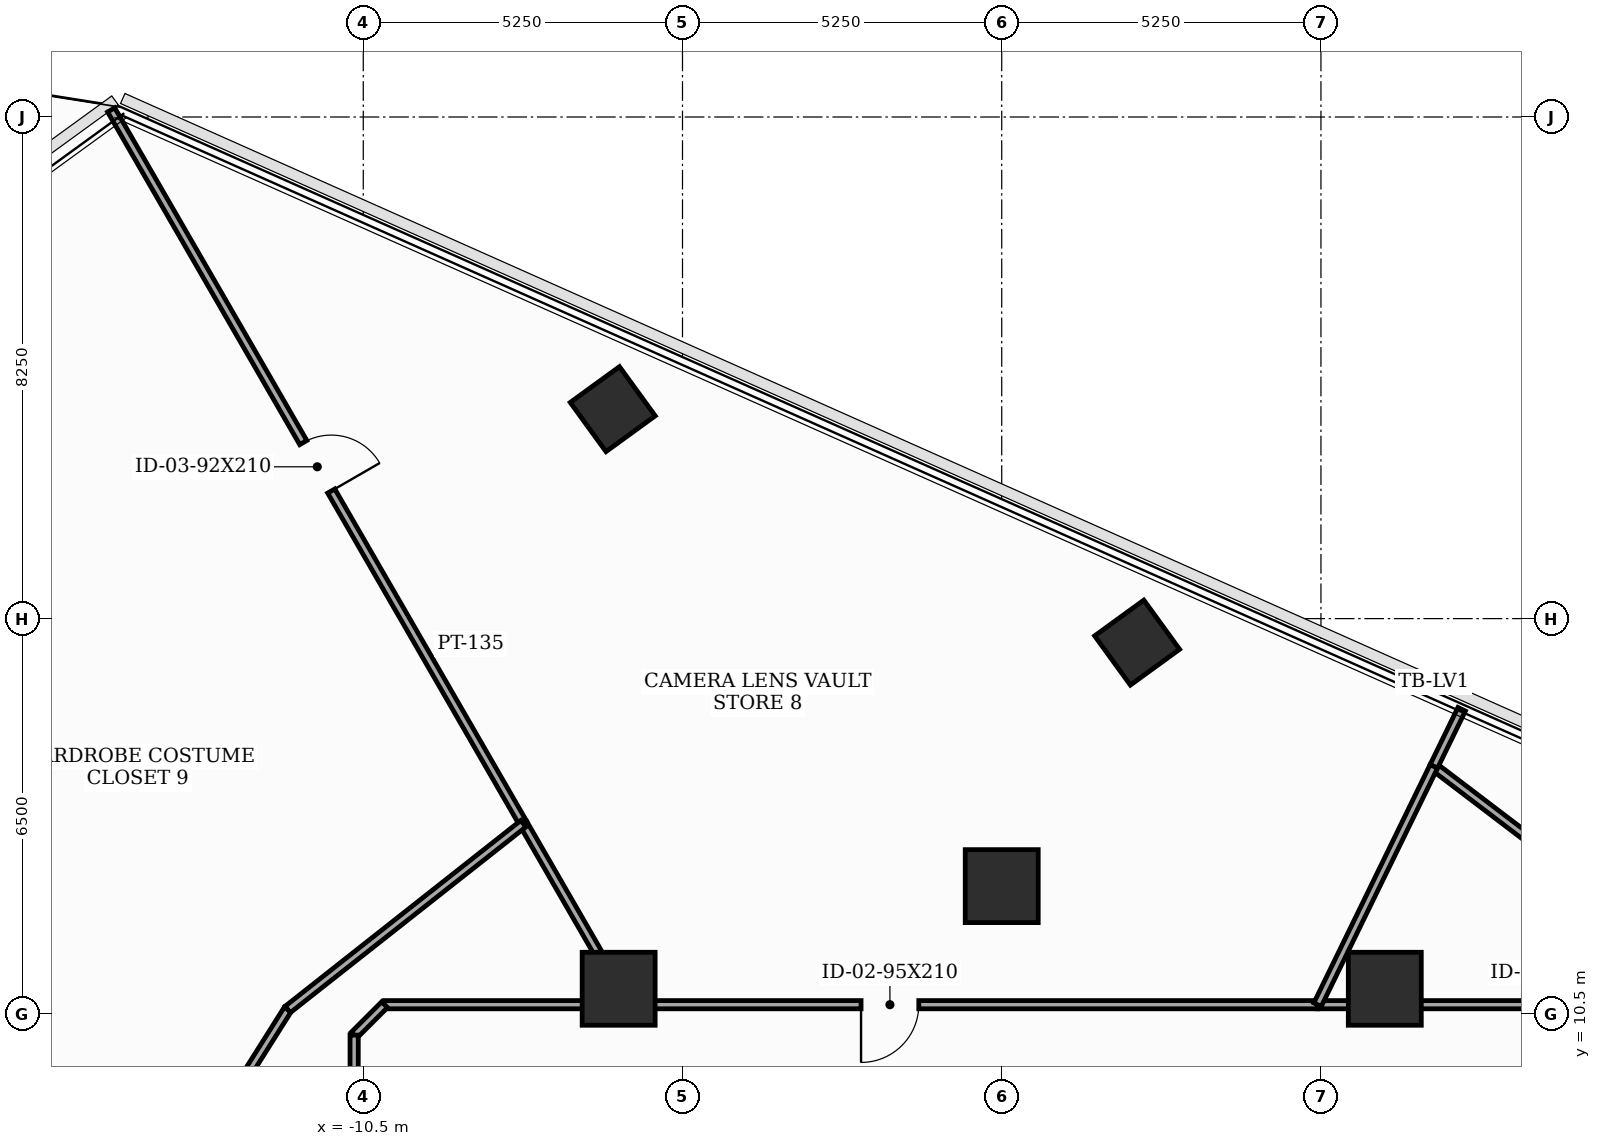
"""IFC4 building model, lengths in metres.
Left out: names, types, materials, properties, quantities, classifications, styles, units other than length and angle.
Written with IfcOpenShell. Run it as: python <this file> out.ifc"""

import sys

from ifc_helpers import new_model, si_unit, direction, frame, frame_2d, origin, origin_2d, place, context, subcontext, project, spatial, rectangle, extrude, element, fill, save


model = new_model("IFC4")
c1 = context("Model", 3, precision=1e-05, world=origin(), true_north=direction((0.0, 1.0)))
c2 = subcontext(c1, "Body", "Model", "MODEL_VIEW")
j1 = project(units=[si_unit("LENGTHUNIT", "METRE"), si_unit("PLANEANGLEUNIT", "RADIAN")], contexts=[c1])
p1 = place(None, origin())
s1 = spatial("IfcSite", under=j1, at=p1, CompositionType="ELEMENT")
p2 = place(p1, origin())
s2 = spatial("IfcBuilding", under=s1, at=p2, CompositionType="ELEMENT")
p3 = place(p2, frame((0.0, 0.0, 154.6)))
s3 = spatial("IfcBuildingStorey", under=s2, at=p3, CompositionType="ELEMENT", Elevation=154.6)
for number, where, z_axis, x_axis in (
    (1, (6.3, 10.912, 0.0), (0.0, 0.0, 1.0), (1.0, 0.0, 0.0)),
    (2, (0.0, 12.6, 0.0), (0.0, 0.0, 1.0), (1.0, 0.0, 0.0)),
    (3, (-6.3, 10.912, 0.0), (0.0, 0.0, 1.0), (1.0, 0.0, 0.0)),
):
    element("IfcColumn", number, at=place(p3, frame(where, z_axis=z_axis, x_axis=x_axis)), inside=s3, PredefinedType="COLUMN", context=c2, shape_type="SweptSolid", body=[
        extrude(rectangle(XDim=1.2, YDim=1.2, at=origin_2d()), origin(), (0.0, 0.0, 1.0), 3.7),
    ])
for number, where, z_axis, x_axis in (
    (4, (2.227, 16.605, 0.0), (0.0, 0.0, 1.0), (0.809, 0.588, 0.0)),
    (5, (-6.397, 20.445, 0.0), (0.0, 0.0, 1.0), (0.809, 0.588, 0.0)),
):
    element("IfcColumn", number, at=place(p3, frame(where, z_axis=z_axis, x_axis=x_axis)), inside=s3, PredefinedType="COLUMN", context=c2, shape_type="SweptSolid", body=[
        extrude(rectangle(XDim=1.0, YDim=1.0, at=origin_2d()), origin(), (0.0, 0.0, 1.0), 3.7),
    ])
p4 = place(p3, frame((10.15, 10.65, 0.0), z_axis=(0.0, 0.0, 1.0), x_axis=(-1.0, 0.0, 0.0)))
e6 = element("IfcWall", 6, at=p4, inside=s3, PredefinedType="PARTITIONING", context=c2, shape_type="SweptSolid", body=[
    extrude(rectangle(XDim=4.956, YDim=0.135, at=frame_2d((2.478, 0.0))), origin(), (0.0, 0.0, 1.0), 2.885),
])
p5 = place(p4, frame((0.516, 0.0, 0.0)))
e7 = element("IfcOpeningElement", 7, at=p5, cuts=e6, PredefinedType="OPENING", context=c2, shape_type="SweptSolid", body=[
    extrude(rectangle(XDim=0.95, YDim=2.1, at=frame_2d((0.475, 1.05))), frame((0.0, 0.077, 0.0), z_axis=(0.0, -1.0, 0.0), x_axis=(1.0, 0.0, 0.0)), (0.0, 0.0, 1.0), 0.155),
])
p6 = place(p3, frame((5.194, 10.65, 0.0), z_axis=(0.0, 0.0, 1.0), x_axis=(-1.0, 0.0, 0.0)))
e8 = element("IfcWall", 8, at=p6, inside=s3, PredefinedType="PARTITIONING", context=c2, shape_type="SweptSolid", body=[
    extrude(rectangle(XDim=11.343, YDim=0.135, at=frame_2d((5.671, 0.0))), origin(), (0.0, 0.0, 1.0), 2.885),
])
p7 = place(p6, frame((6.558, 0.0, 0.0)))
e9 = element("IfcOpeningElement", 9, at=p7, cuts=e8, PredefinedType="OPENING", context=c2, shape_type="SweptSolid", body=[
    extrude(rectangle(XDim=0.95, YDim=2.1, at=frame_2d((0.475, 1.05))), frame((0.0, 0.077, 0.0), z_axis=(0.0, -1.0, 0.0), x_axis=(1.0, 0.0, 0.0)), (0.0, 0.0, 1.0), 0.155),
])
p8 = place(p3, frame((-6.149, 10.65, 0.0), z_axis=(0.0, 0.0, 1.0), x_axis=(-1.0, 0.0, 0.0)))
e10 = element("IfcWall", 10, at=p8, inside=s3, PredefinedType="PARTITIONING", context=c2, shape_type="SweptSolid", body=[
    extrude(rectangle(XDim=4.001, YDim=0.135, at=frame_2d((2.0, 0.0))), origin(), (0.0, 0.0, 1.0), 2.885),
])
p9 = place(p3, frame((-10.15, 10.65, 0.0), z_axis=(0.0, 0.0, 1.0), x_axis=(-0.707106781187, -0.707106781187, 0.0)))
e11 = element("IfcWall", 11, at=p9, inside=s3, PredefinedType="PARTITIONING", context=c2, shape_type="SweptSolid", body=[
    extrude(rectangle(XDim=0.707, YDim=0.135, at=frame_2d((0.354, 0.0))), origin(), (0.0, 0.0, 1.0), 3.5),
])
p10 = place(p3, frame((-10.65, 10.15, 0.0), z_axis=(0.0, 0.0, 1.0), x_axis=(0.0, -1.0, 0.0)))
e12 = element("IfcWall", 12, at=p10, inside=s3, PredefinedType="PARTITIONING", context=c2, shape_type="SweptSolid", body=[
    extrude(rectangle(XDim=5.408, YDim=0.135, at=frame_2d((2.704, 0.0))), origin(), (0.0, 0.0, 1.0), 2.885),
])
p11 = place(p10, frame((0.607, 0.0, 0.0)))
e13 = element("IfcOpeningElement", 13, at=p11, cuts=e12, PredefinedType="OPENING", context=c2, shape_type="SweptSolid", body=[
    extrude(rectangle(XDim=0.95, YDim=2.1, at=frame_2d((0.475, 1.05))), frame((0.0, 0.077, 0.0), z_axis=(0.0, -1.0, 0.0), x_axis=(1.0, 0.0, 0.0)), (0.0, 0.0, 1.0), 0.155),
])
p12 = place(p3, frame((7.106, 14.569, 0.0), z_axis=(0.0, 0.0, 1.0), x_axis=(0.795990968219, -0.60530849863, 0.0)))
e14 = element("IfcWall", 14, at=p12, inside=s3, PredefinedType="PARTITIONING", context=c2, shape_type="SweptSolid", body=[
    extrude(rectangle(XDim=6.76, YDim=0.135, at=frame_2d((3.38, 0.0))), origin(), (0.0, 0.0, 1.0), 2.885),
])
p13 = place(p3, frame((7.564, 15.51, 0.0), z_axis=(0.0, 0.0, 1.0), x_axis=(-0.438230528202, -0.898862616951, 0.0)))
e15 = element("IfcWall", 15, at=p13, inside=s3, PredefinedType="PARTITIONING", context=c2, shape_type="SweptSolid", body=[
    extrude(rectangle(XDim=1.046, YDim=0.135, at=frame_2d((0.523, 0.0))), origin(), (0.0, 0.0, 1.0), 2.985),
])
p14 = place(p3, frame((7.106, 14.569, 0.0), z_axis=(0.0, 0.0, 1.0), x_axis=(-0.43843576568, -0.898762526684, 0.0)))
e16 = element("IfcWall", 16, at=p14, inside=s3, PredefinedType="PARTITIONING", context=c2, shape_type="SweptSolid", body=[
    extrude(rectangle(XDim=4.361, YDim=0.135, at=frame_2d((2.18, 0.0))), origin(), (0.0, 0.0, 1.0), 2.885),
])
p15 = place(p3, frame((-14.646, 25.367, 0.0), z_axis=(0.0, 0.0, 1.0), x_axis=(0.500047745944, -0.865997835896, 0.0)))
e17 = element("IfcWall", 17, at=p15, inside=s3, PredefinedType="PARTITIONING", context=c2, shape_type="SweptSolid", body=[
    extrude(rectangle(XDim=13.556, YDim=0.135, at=frame_2d((6.778, 0.0))), origin(), (0.0, 0.0, 1.0), 2.985),
])
p16 = place(p15, frame((6.318, 0.0, 0.0)))
e18 = element("IfcOpeningElement", 18, at=p16, cuts=e17, PredefinedType="OPENING", context=c2, shape_type="SweptSolid", body=[
    extrude(rectangle(XDim=0.92, YDim=2.1, at=frame_2d((0.46, 1.05))), frame((0.0, 0.077, 0.0), z_axis=(0.0, -1.0, 0.0), x_axis=(1.0, 0.0, 0.0)), (0.0, 0.0, 1.0), 0.155),
])
p17 = place(p3, frame((-7.867, 13.627, 0.0), z_axis=(0.0, 0.0, 1.0), x_axis=(0.499829032188, -0.866124089598, 0.0)))
e19 = element("IfcWall", 19, at=p17, inside=s3, PredefinedType="PARTITIONING", context=c2, shape_type="SweptSolid", body=[
    extrude(rectangle(XDim=3.437, YDim=0.135, at=frame_2d((1.719, 0.0))), origin(), (0.0, 0.0, 1.0), 2.885),
])
p18 = place(p3, frame((-14.374, 6.4, 0.0), z_axis=(0.0, 0.0, 1.0), x_axis=(0.53356651363, 0.845758106986, 0.0)))
e20 = element("IfcWall", 20, at=p18, inside=s3, PredefinedType="PARTITIONING", context=c2, shape_type="SweptSolid", body=[
    extrude(rectangle(XDim=4.933, YDim=0.135, at=frame_2d((2.467, 0.0))), origin(), (0.0, 0.0, 1.0), 2.885),
])
p19 = place(p3, frame((-11.742, 10.572, 0.0), z_axis=(0.0, 0.0, 1.0), x_axis=(0.785304323173, 0.619109941776, 0.0)))
e21 = element("IfcWall", 21, at=p19, inside=s3, PredefinedType="PARTITIONING", context=c2, shape_type="SweptSolid", body=[
    extrude(rectangle(XDim=4.934, YDim=0.135, at=frame_2d((2.467, 0.0))), origin(), (0.0, 0.0, 1.0), 3.5),
])
p20 = place(p7, origin())
e22 = element("IfcDoor", 22, at=p20, inside=s3, OperationType="SINGLE_SWING_RIGHT", PredefinedType="DOOR", context=c2, shape_type="SweptSolid", body=[
    extrude(rectangle(XDim=0.95, YDim=2.1, at=frame_2d((0.475, 1.05))), frame((0.0, 0.025, 0.0), z_axis=(0.0, -1.0, 0.0), x_axis=(1.0, 0.0, 0.0)), (0.0, 0.0, 1.0), 0.05),
])
fill(e9, e22)
p21 = place(p16, origin())
e23 = element("IfcDoor", 23, at=p21, inside=s3, OperationType="SINGLE_SWING_RIGHT", PredefinedType="DOOR", context=c2, shape_type="SweptSolid", body=[
    extrude(rectangle(XDim=0.92, YDim=2.1, at=frame_2d((0.46, 1.05))), frame((0.0, 0.025, 0.0), z_axis=(0.0, -1.0, 0.0), x_axis=(1.0, 0.0, 0.0)), (0.0, 0.0, 1.0), 0.05),
])
fill(e18, e23)
save(model, sys.argv[1])
